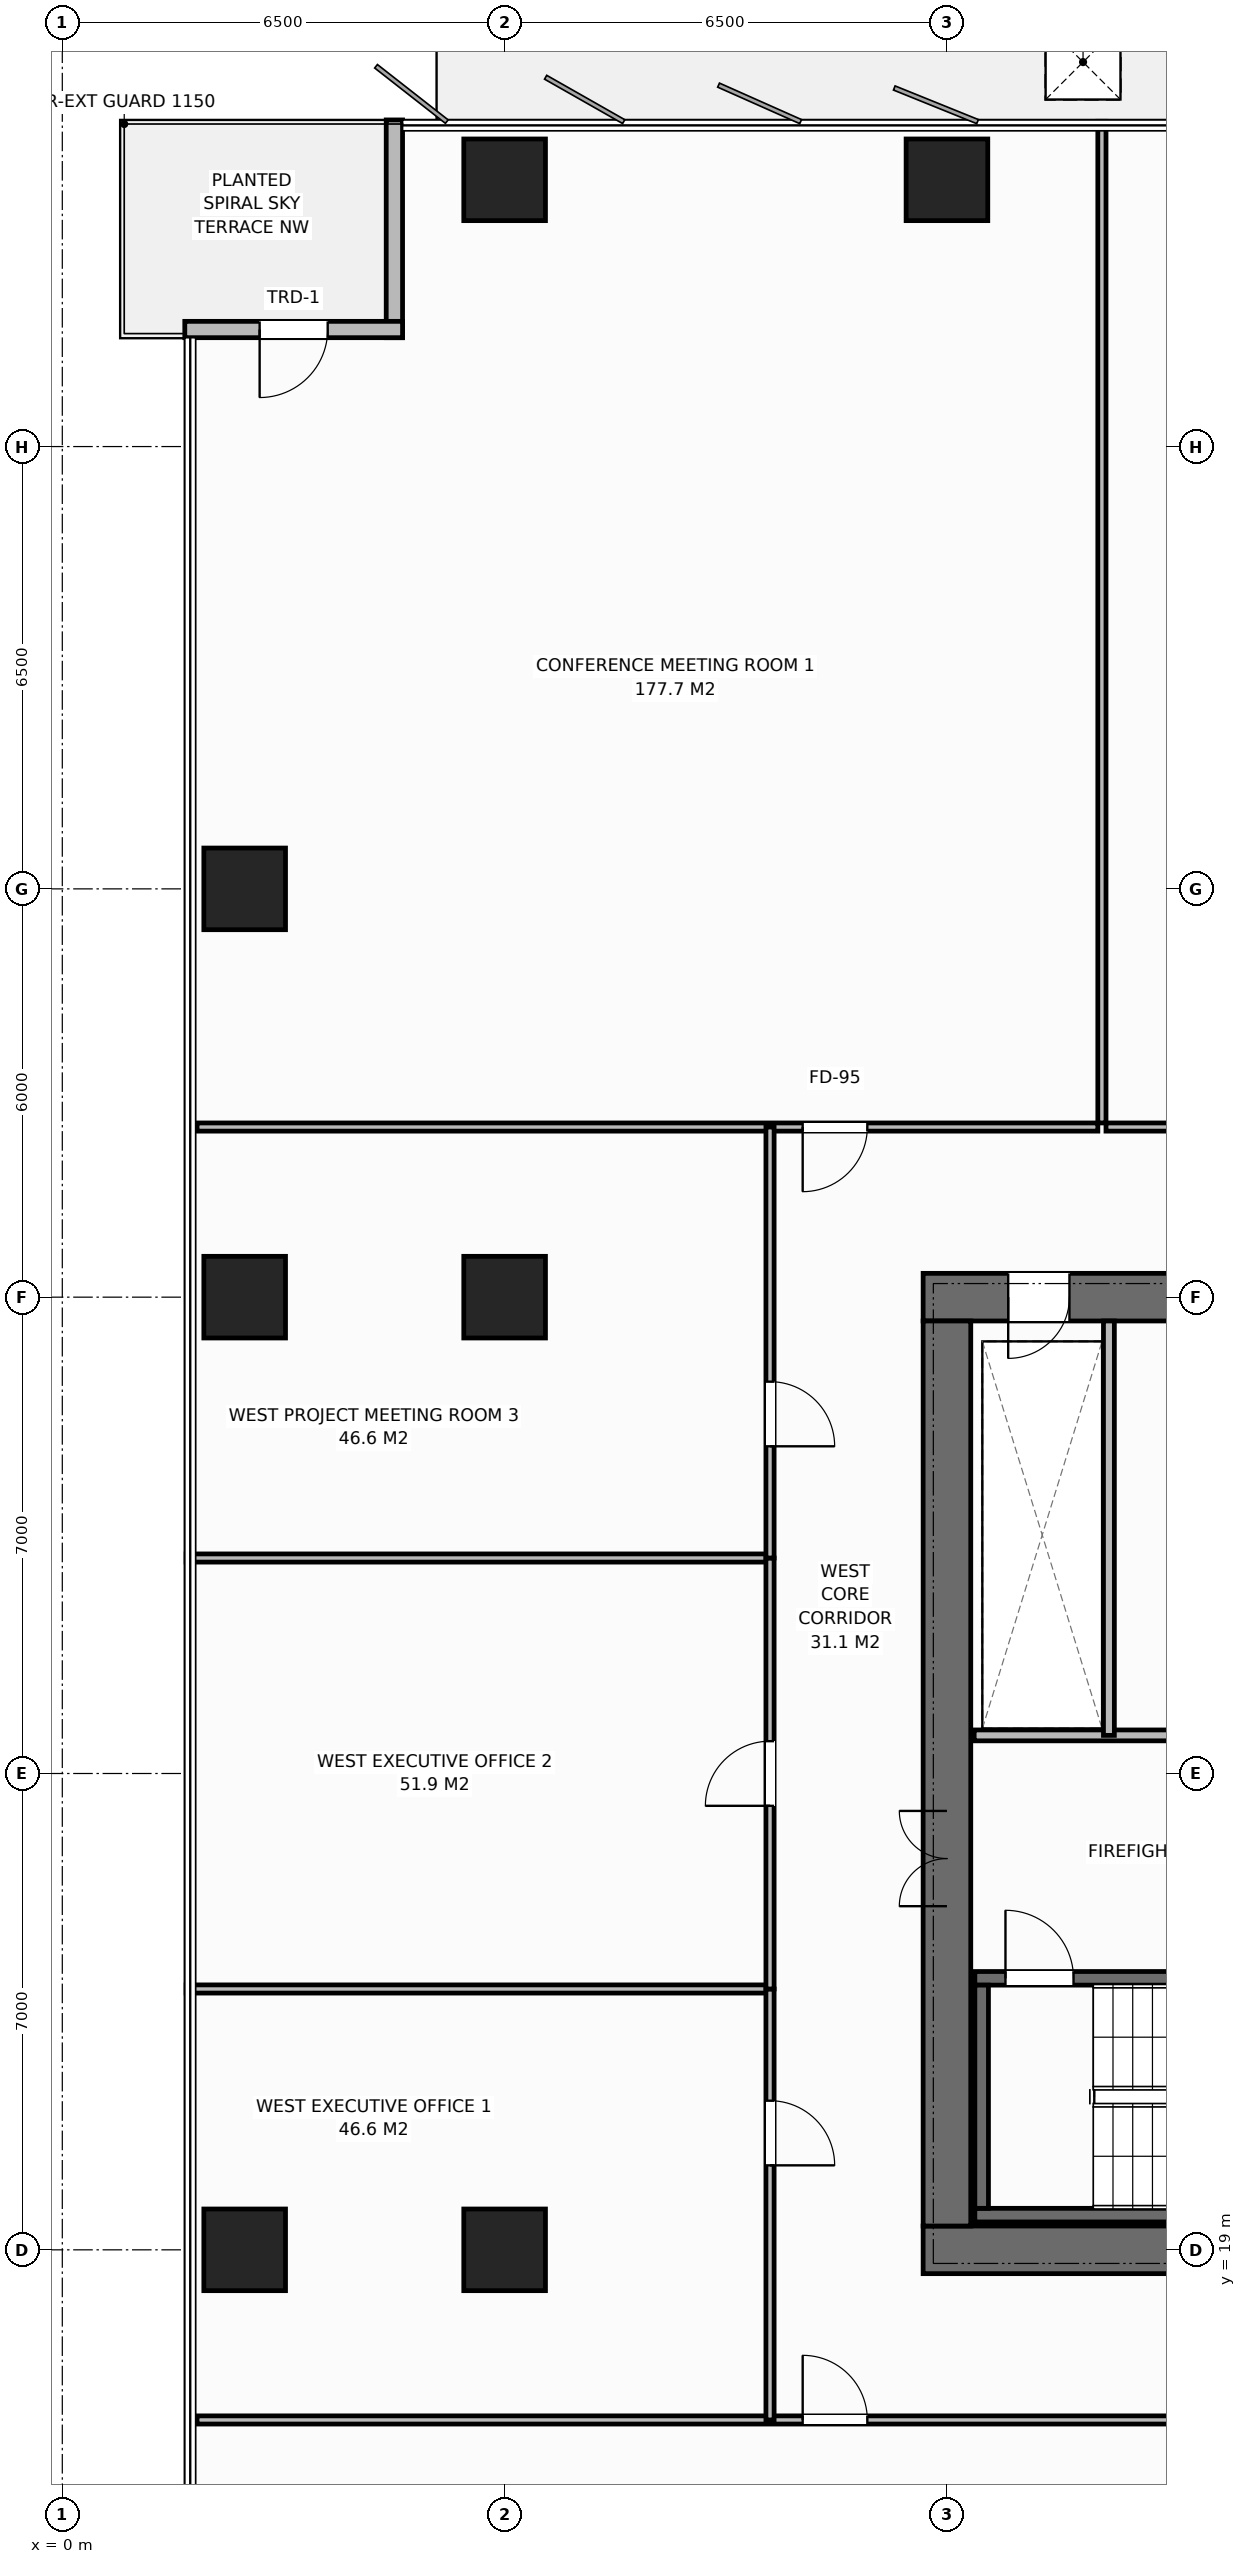
"""IFC4 building model, lengths in metres.
Left out: names, types, materials, properties, quantities, classifications, styles, units other than length and angle.
Written with IfcOpenShell. Run it as: python <this file> out.ifc"""

import sys

from ifc_helpers import new_model, si_unit, direction, frame, frame_2d, origin, origin_2d, place, context, subcontext, project, spatial, rectangle, extrude, element, fill, save


model = new_model("IFC4")
c1 = context("Model", 3, precision=1e-05, world=origin(), true_north=direction((0.0, 1.0)))
c2 = subcontext(c1, "Body", "Model", "MODEL_VIEW")
j1 = project(units=[si_unit("LENGTHUNIT", "METRE"), si_unit("PLANEANGLEUNIT", "RADIAN")], contexts=[c1])
p1 = place(None, origin())
s1 = spatial("IfcSite", under=j1, at=p1, CompositionType="ELEMENT")
p2 = place(p1, origin())
s2 = spatial("IfcBuilding", under=s1, at=p2, CompositionType="ELEMENT")
p3 = place(p2, frame((0.0, 0.0, 86.0)))
s3 = spatial("IfcBuildingStorey", under=s2, at=p3, CompositionType="ELEMENT", Elevation=86.0)
p4 = place(p3, frame((12.65, 19.0, 0.0), z_axis=(0.0, 0.0, 1.0), x_axis=(1.0, 0.0, 0.0)))
e1 = element("IfcWall", 1, at=p4, inside=s3, PredefinedType="SHEAR", context=c2, shape_type="SweptSolid", body=[
    extrude(rectangle(XDim=13.7, YDim=0.7, at=frame_2d((6.85, 0.0))), origin(), (0.0, 0.0, 1.0), 3.8),
])
p5 = place(p4, frame((9.23, 0.0, 0.0)))
e2 = element("IfcOpeningElement", 2, at=p5, cuts=e1, PredefinedType="OPENING", context=c2, shape_type="SweptSolid", body=[
    extrude(rectangle(XDim=1.4, YDim=2.2, at=frame_2d((0.7, 1.1))), frame((0.0, 0.36, 0.0), z_axis=(0.0, -1.0, 0.0), x_axis=(1.0, 0.0, 0.0)), (0.0, 0.0, 1.0), 0.72),
])
p6 = place(p3, frame((12.65, 33.0, 0.0), z_axis=(0.0, 0.0, 1.0), x_axis=(1.0, 0.0, 0.0)))
e3 = element("IfcWall", 3, at=p6, inside=s3, PredefinedType="SHEAR", context=c2, shape_type="SweptSolid", body=[
    extrude(rectangle(XDim=13.7, YDim=0.7, at=frame_2d((6.85, 0.0))), origin(), (0.0, 0.0, 1.0), 3.8),
])
p7 = place(p6, frame((1.25, 0.0, 0.0)))
e4 = element("IfcOpeningElement", 4, at=p7, cuts=e3, PredefinedType="OPENING", context=c2, shape_type="SweptSolid", body=[
    extrude(rectangle(XDim=0.9, YDim=2.15, at=frame_2d((0.45, 1.075))), frame((0.0, 0.36, 0.0), z_axis=(0.0, -1.0, 0.0), x_axis=(1.0, 0.0, 0.0)), (0.0, 0.0, 1.0), 0.72),
])
p8 = place(p6, frame((3.85, 0.0, 0.0)))
e5 = element("IfcOpeningElement", 5, at=p8, cuts=e3, PredefinedType="OPENING", context=c2, shape_type="SweptSolid", body=[
    extrude(rectangle(XDim=0.95, YDim=2.15, at=frame_2d((0.475, 1.075))), frame((0.0, 0.36, 0.0), z_axis=(0.0, -1.0, 0.0), x_axis=(1.0, 0.0, 0.0)), (0.0, 0.0, 1.0), 0.72),
])
p9 = place(p6, frame((6.85, 0.0, 0.0)))
e6 = element("IfcOpeningElement", 6, at=p9, cuts=e3, PredefinedType="OPENING", context=c2, shape_type="SweptSolid", body=[
    extrude(rectangle(XDim=0.95, YDim=2.15, at=frame_2d((0.475, 1.075))), frame((0.0, 0.36, 0.0), z_axis=(0.0, -1.0, 0.0), x_axis=(1.0, 0.0, 0.0)), (0.0, 0.0, 1.0), 0.72),
])
p10 = place(p6, frame((9.23, 0.0, 0.0)))
e7 = element("IfcOpeningElement", 7, at=p10, cuts=e3, PredefinedType="OPENING", context=c2, shape_type="SweptSolid", body=[
    extrude(rectangle(XDim=1.4, YDim=2.2, at=frame_2d((0.7, 1.1))), frame((0.0, 0.36, 0.0), z_axis=(0.0, -1.0, 0.0), x_axis=(1.0, 0.0, 0.0)), (0.0, 0.0, 1.0), 0.72),
])
p11 = place(p3, frame((13.0, 19.35, 0.0), z_axis=(0.0, 0.0, 1.0), x_axis=(0.0, 1.0, 0.0)))
e8 = element("IfcWall", 8, at=p11, inside=s3, PredefinedType="SHEAR", context=c2, shape_type="SweptSolid", body=[
    extrude(rectangle(XDim=13.3, YDim=0.7, at=frame_2d((6.65, 0.0))), origin(), (0.0, 0.0, 1.0), 3.8),
])
p12 = place(p11, frame((4.7, 0.0, 0.0)))
e9 = element("IfcOpeningElement", 9, at=p12, cuts=e8, PredefinedType="OPENING", context=c2, shape_type="SweptSolid", body=[
    extrude(rectangle(XDim=1.4, YDim=2.2, at=frame_2d((0.7, 1.1))), frame((0.0, 0.36, 0.0), z_axis=(0.0, -1.0, 0.0), x_axis=(1.0, 0.0, 0.0)), (0.0, 0.0, 1.0), 0.72),
])
p13 = place(p3, frame((13.41, 19.51, 0.0), z_axis=(0.0, 0.0, 1.0), x_axis=(1.0, 0.0, 0.0)))
e10 = element("IfcWall", 10, at=p13, inside=s3, PredefinedType="SHEAR", context=c2, shape_type="SweptSolid", body=[
    extrude(rectangle(XDim=8.43, YDim=0.2, at=frame_2d((4.215, 0.0))), origin(), (0.0, 0.0, 1.0), 3.8),
])
p14 = place(p3, frame((13.41, 22.99, 0.0), z_axis=(0.0, 0.0, 1.0), x_axis=(1.0, 0.0, 0.0)))
e11 = element("IfcWall", 11, at=p14, inside=s3, PredefinedType="SHEAR", context=c2, shape_type="SweptSolid", body=[
    extrude(rectangle(XDim=8.43, YDim=0.2, at=frame_2d((4.215, 0.0))), origin(), (0.0, 0.0, 1.0), 3.8),
])
p15 = place(p14, frame((0.45, 0.0, 0.0)))
e12 = element("IfcOpeningElement", 12, at=p15, cuts=e11, PredefinedType="OPENING", context=c2, shape_type="SweptSolid", body=[
    extrude(rectangle(XDim=1.0, YDim=2.15, at=frame_2d((0.5, 1.075))), frame((0.0, 0.11, 0.0), z_axis=(0.0, -1.0, 0.0), x_axis=(1.0, 0.0, 0.0)), (0.0, 0.0, 1.0), 0.22),
])
p16 = place(p3, frame((13.51, 19.61, 0.0), z_axis=(0.0, 0.0, 1.0), x_axis=(0.0, 1.0, 0.0)))
e13 = element("IfcWall", 13, at=p16, inside=s3, PredefinedType="SHEAR", context=c2, shape_type="SweptSolid", body=[
    extrude(rectangle(XDim=3.28, YDim=0.2, at=frame_2d((1.64, 0.0))), origin(), (0.0, 0.0, 1.0), 3.8),
])
for number, where, z_axis, x_axis in (
    (14, (6.5, 19.0, 0.0), (0.0, 0.0, 1.0), (1.0, 0.0, 0.0)),
    (15, (6.5, 33.0, 0.0), (0.0, 0.0, 1.0), (1.0, 0.0, 0.0)),
    (16, (6.5, 49.42, 0.0), (0.0, 0.0, 1.0), (1.0, 0.0, 0.0)),
    (17, (13.0, 49.42, 0.0), (0.0, 0.0, 1.0), (1.0, 0.0, 0.0)),
    (18, (2.68, 19.0, 0.0), (0.0, 0.0, 1.0), (1.0, 0.0, 0.0)),
    (19, (2.68, 33.0, 0.0), (0.0, 0.0, 1.0), (1.0, 0.0, 0.0)),
    (20, (2.68, 39.0, 0.0), (0.0, 0.0, 1.0), (1.0, 0.0, 0.0)),
):
    element("IfcColumn", number, at=place(p3, frame(where, z_axis=z_axis, x_axis=x_axis)), inside=s3, PredefinedType="COLUMN", context=c2, shape_type="SweptSolid", body=[
        extrude(rectangle(XDim=1.2, YDim=1.2, at=origin_2d()), origin(), (0.0, 0.0, 1.0), 3.8),
    ])
p17 = place(p3, frame((4.88, 47.1, 0.0), z_axis=(0.0, 0.0, 1.0), x_axis=(0.0, 1.0, 0.0)))
e21 = element("IfcWall", 21, at=p17, inside=s3, PredefinedType="STANDARD", context=c2, shape_type="SweptSolid", body=[
    extrude(rectangle(XDim=3.2, YDim=0.24, at=frame_2d((1.6, 0.0))), origin(), (0.0, 0.0, 1.0), 3.565),
])
p18 = place(p3, frame((1.8, 47.22, 0.0), z_axis=(0.0, 0.0, 1.0), x_axis=(1.0, 0.0, 0.0)))
e22 = element("IfcWall", 22, at=p18, inside=s3, PredefinedType="STANDARD", context=c2, shape_type="SweptSolid", body=[
    extrude(rectangle(XDim=3.2, YDim=0.24, at=frame_2d((1.6, 0.0))), origin(), (0.0, 0.0, 1.0), 3.565),
])
p19 = place(p18, frame((1.1, 0.0, 0.0)))
e23 = element("IfcOpeningElement", 23, at=p19, cuts=e22, PredefinedType="OPENING", context=c2, shape_type="SweptSolid", body=[
    extrude(rectangle(XDim=1.0, YDim=2.2, at=frame_2d((0.5, 1.1))), frame((0.0, 0.13, 0.0), z_axis=(0.0, -1.0, 0.0), x_axis=(1.0, 0.0, 0.0)), (0.0, 0.0, 1.0), 0.26),
])
p20 = place(p3, frame((13.4, 26.56, 0.0), z_axis=(0.0, 0.0, 1.0), x_axis=(1.0, 0.0, 0.0)))
e24 = element("IfcWall", 24, at=p20, inside=s3, PredefinedType="STANDARD", context=c2, shape_type="SweptSolid", body=[
    extrude(rectangle(XDim=8.34, YDim=0.16, at=frame_2d((4.17, 0.0))), origin(), (0.0, 0.0, 1.0), 3.565),
])
p21 = place(p3, frame((15.38, 26.56, 0.0), z_axis=(0.0, 0.0, 1.0), x_axis=(0.0, 1.0, 0.0)))
e25 = element("IfcWall", 25, at=p21, inside=s3, PredefinedType="STANDARD", context=c2, shape_type="SweptSolid", body=[
    extrude(rectangle(XDim=6.09, YDim=0.16, at=frame_2d((3.045, 0.0))), origin(), (0.0, 0.0, 1.0), 3.565),
])
p22 = place(p3, frame((15.277, 35.56, 0.0), z_axis=(0.0, 0.0, 1.0), x_axis=(0.0, 1.0, 0.0)))
e26 = element("IfcWall", 26, at=p22, inside=s3, PredefinedType="PARTITIONING", context=c2, shape_type="SweptSolid", body=[
    extrude(rectangle(XDim=14.72, YDim=0.12, at=frame_2d((7.36, 0.0))), origin(), (0.0, 0.0, 1.0), 3.565),
])
p23 = place(p3, frame((1.98, 35.5, 0.0), z_axis=(0.0, 0.0, 1.0), x_axis=(1.0, 0.0, 0.0)))
e27 = element("IfcWall", 27, at=p23, inside=s3, PredefinedType="PARTITIONING", context=c2, shape_type="SweptSolid", body=[
    extrude(rectangle(XDim=13.237, YDim=0.12, at=frame_2d((6.619, 0.0))), origin(), (0.0, 0.0, 1.0), 3.565),
])
p24 = place(p23, frame((8.9, 0.0, 0.0)))
e28 = element("IfcOpeningElement", 28, at=p24, cuts=e27, PredefinedType="OPENING", context=c2, shape_type="SweptSolid", body=[
    extrude(rectangle(XDim=0.95, YDim=2.15, at=frame_2d((0.475, 1.075))), frame((0.0, 0.07, 0.0), z_axis=(0.0, -1.0, 0.0), x_axis=(1.0, 0.0, 0.0)), (0.0, 0.0, 1.0), 0.14),
])
p25 = place(p3, frame((15.337, 35.5, 0.0), z_axis=(0.0, 0.0, 1.0), x_axis=(1.0, 0.0, 0.0)))
e29 = element("IfcWall", 29, at=p25, inside=s3, PredefinedType="PARTITIONING", context=c2, shape_type="SweptSolid", body=[
    extrude(rectangle(XDim=15.64, YDim=0.12, at=frame_2d((7.82, 0.0))), origin(), (0.0, 0.0, 1.0), 3.565),
])
p26 = place(p25, frame((7.345, 0.0, 0.0)))
e30 = element("IfcOpeningElement", 30, at=p26, cuts=e29, PredefinedType="OPENING", context=c2, shape_type="SweptSolid", body=[
    extrude(rectangle(XDim=0.95, YDim=2.15, at=frame_2d((0.475, 1.075))), frame((0.0, 0.07, 0.0), z_axis=(0.0, -1.0, 0.0), x_axis=(1.0, 0.0, 0.0)), (0.0, 0.0, 1.0), 0.14),
])
p27 = place(p3, frame((1.98, 16.5, 0.0), z_axis=(0.0, 0.0, 1.0), x_axis=(1.0, 0.0, 0.0)))
e31 = element("IfcWall", 31, at=p27, inside=s3, PredefinedType="PARTITIONING", context=c2, shape_type="SweptSolid", body=[
    extrude(rectangle(XDim=24.203, YDim=0.12, at=frame_2d((12.102, 0.0))), origin(), (0.0, 0.0, 1.0), 3.565),
])
p28 = place(p27, frame((8.9, 0.0, 0.0)))
e32 = element("IfcOpeningElement", 32, at=p28, cuts=e31, PredefinedType="OPENING", context=c2, shape_type="SweptSolid", body=[
    extrude(rectangle(XDim=0.95, YDim=2.15, at=frame_2d((0.475, 1.075))), frame((0.0, 0.07, 0.0), z_axis=(0.0, -1.0, 0.0), x_axis=(1.0, 0.0, 0.0)), (0.0, 0.0, 1.0), 0.14),
])
p29 = place(p3, frame((1.82, 22.833, 0.0), z_axis=(0.0, 0.0, 1.0), x_axis=(1.0, 0.0, 0.0)))
e33 = element("IfcWall", 33, at=p29, inside=s3, PredefinedType="PARTITIONING", context=c2, shape_type="SweptSolid", body=[
    extrude(rectangle(XDim=8.58, YDim=0.12, at=frame_2d((4.29, 0.0))), origin(), (0.0, 0.0, 1.0), 3.565),
])
p30 = place(p3, frame((10.4, 16.5, 0.0), z_axis=(0.0, 0.0, 1.0), x_axis=(0.0, 1.0, 0.0)))
e34 = element("IfcWall", 34, at=p30, inside=s3, PredefinedType="PARTITIONING", context=c2, shape_type="SweptSolid", body=[
    extrude(rectangle(XDim=6.333, YDim=0.12, at=frame_2d((3.167, 0.0))), origin(), (0.0, 0.0, 1.0), 3.565),
])
p31 = place(p30, frame((3.742, 0.0, 0.0)))
e35 = element("IfcOpeningElement", 35, at=p31, cuts=e34, PredefinedType="OPENING", context=c2, shape_type="SweptSolid", body=[
    extrude(rectangle(XDim=0.95, YDim=2.15, at=frame_2d((0.475, 1.075))), frame((0.0, 0.07, 0.0), z_axis=(0.0, -1.0, 0.0), x_axis=(1.0, 0.0, 0.0)), (0.0, 0.0, 1.0), 0.14),
])
p32 = place(p3, frame((1.82, 29.167, 0.0), z_axis=(0.0, 0.0, 1.0), x_axis=(1.0, 0.0, 0.0)))
e36 = element("IfcWall", 36, at=p32, inside=s3, PredefinedType="PARTITIONING", context=c2, shape_type="SweptSolid", body=[
    extrude(rectangle(XDim=8.58, YDim=0.12, at=frame_2d((4.29, 0.0))), origin(), (0.0, 0.0, 1.0), 3.565),
])
p33 = place(p3, frame((10.4, 22.833, 0.0), z_axis=(0.0, 0.0, 1.0), x_axis=(0.0, 1.0, 0.0)))
e37 = element("IfcWall", 37, at=p33, inside=s3, PredefinedType="PARTITIONING", context=c2, shape_type="SweptSolid", body=[
    extrude(rectangle(XDim=6.333, YDim=0.12, at=frame_2d((3.167, 0.0))), origin(), (0.0, 0.0, 1.0), 3.565),
])
p34 = place(p33, frame((2.692, 0.0, 0.0)))
e38 = element("IfcOpeningElement", 38, at=p34, cuts=e37, PredefinedType="OPENING", context=c2, shape_type="SweptSolid", body=[
    extrude(rectangle(XDim=0.95, YDim=2.15, at=frame_2d((0.475, 1.075))), frame((0.0, 0.07, 0.0), z_axis=(0.0, -1.0, 0.0), x_axis=(1.0, 0.0, 0.0)), (0.0, 0.0, 1.0), 0.14),
])
p35 = place(p3, frame((10.4, 29.167, 0.0), z_axis=(0.0, 0.0, 1.0), x_axis=(0.0, 1.0, 0.0)))
e39 = element("IfcWall", 39, at=p35, inside=s3, PredefinedType="PARTITIONING", context=c2, shape_type="SweptSolid", body=[
    extrude(rectangle(XDim=6.333, YDim=0.12, at=frame_2d((3.167, 0.0))), origin(), (0.0, 0.0, 1.0), 3.565),
])
p36 = place(p35, frame((1.642, 0.0, 0.0)))
e40 = element("IfcOpeningElement", 40, at=p36, cuts=e39, PredefinedType="OPENING", context=c2, shape_type="SweptSolid", body=[
    extrude(rectangle(XDim=0.95, YDim=2.15, at=frame_2d((0.475, 1.075))), frame((0.0, 0.07, 0.0), z_axis=(0.0, -1.0, 0.0), x_axis=(1.0, 0.0, 0.0)), (0.0, 0.0, 1.0), 0.14),
])
p37 = place(p19, origin())
e41 = element("IfcDoor", 41, at=p37, inside=s3, OperationType="SINGLE_SWING_RIGHT", PredefinedType="DOOR", context=c2, shape_type="SweptSolid", body=[
    extrude(rectangle(XDim=1.0, YDim=2.2, at=frame_2d((0.5, 1.1))), frame((0.0, 0.025, 0.0), z_axis=(0.0, -1.0, 0.0), x_axis=(1.0, 0.0, 0.0)), (0.0, 0.0, 1.0), 0.05),
])
fill(e23, e41)
p38 = place(p3, frame((0.0, 0.0, -0.21)))
p39 = place(p38, frame((15.0, 51.15, 0.0)))
p40 = place(p39, frame((0.0, 0.0, 0.21)))
e42 = element("IfcDoor", 42, at=p40, inside=s3, OperationType="SINGLE_SWING_LEFT", PredefinedType="TRAPDOOR", context=c2, shape_type="SweptSolid", body=[
    extrude(rectangle(XDim=1.1, YDim=1.1, at=origin_2d()), origin(), (0.0, 0.0, 1.0), 0.05),
])
p41 = place(p15, origin())
e43 = element("IfcDoor", 43, at=p41, inside=s3, OperationType="SINGLE_SWING_LEFT", PredefinedType="DOOR", context=c2, shape_type="SweptSolid", body=[
    extrude(rectangle(XDim=1.0, YDim=2.15, at=frame_2d((0.5, 1.075))), frame((0.0, 0.025, 0.0), z_axis=(0.0, -1.0, 0.0), x_axis=(1.0, 0.0, 0.0)), (0.0, 0.0, 1.0), 0.05),
])
fill(e12, e43)
p42 = place(p12, origin())
e44 = element("IfcDoor", 44, at=p42, inside=s3, OperationType="DOUBLE_DOOR_SINGLE_SWING", PredefinedType="DOOR", context=c2, shape_type="SweptSolid", body=[
    extrude(rectangle(XDim=1.4, YDim=2.2, at=frame_2d((0.7, 1.1))), frame((0.0, 0.025, 0.0), z_axis=(0.0, -1.0, 0.0), x_axis=(1.0, 0.0, 0.0)), (0.0, 0.0, 1.0), 0.05),
])
fill(e9, e44)
p43 = place(p7, origin())
e45 = element("IfcDoor", 45, at=p43, inside=s3, OperationType="SINGLE_SWING_RIGHT", PredefinedType="DOOR", context=c2, shape_type="SweptSolid", body=[
    extrude(rectangle(XDim=0.9, YDim=2.15, at=frame_2d((0.45, 1.075))), frame((0.0, -0.075, 0.0), z_axis=(0.0, -1.0, 0.0), x_axis=(1.0, 0.0, 0.0)), (0.0, 0.0, 1.0), 0.05),
])
fill(e4, e45)
p44 = place(p24, origin())
e46 = element("IfcDoor", 46, at=p44, inside=s3, OperationType="SINGLE_SWING_RIGHT", PredefinedType="DOOR", context=c2, shape_type="SweptSolid", body=[
    extrude(rectangle(XDim=0.95, YDim=2.15, at=frame_2d((0.475, 1.075))), frame((0.0, 0.025, 0.0), z_axis=(0.0, -1.0, 0.0), x_axis=(1.0, 0.0, 0.0)), (0.0, 0.0, 1.0), 0.05),
])
fill(e28, e46)
p45 = place(p28, origin())
e47 = element("IfcDoor", 47, at=p45, inside=s3, OperationType="SINGLE_SWING_LEFT", PredefinedType="DOOR", context=c2, shape_type="SweptSolid", body=[
    extrude(rectangle(XDim=0.95, YDim=2.15, at=frame_2d((0.475, 1.075))), frame((0.0, 0.025, 0.0), z_axis=(0.0, -1.0, 0.0), x_axis=(1.0, 0.0, 0.0)), (0.0, 0.0, 1.0), 0.05),
])
fill(e32, e47)
p46 = place(p31, origin())
e48 = element("IfcDoor", 48, at=p46, inside=s3, OperationType="SINGLE_SWING_RIGHT", PredefinedType="DOOR", context=c2, shape_type="SweptSolid", body=[
    extrude(rectangle(XDim=0.95, YDim=2.15, at=frame_2d((0.475, 1.075))), frame((0.0, 0.025, 0.0), z_axis=(0.0, -1.0, 0.0), x_axis=(1.0, 0.0, 0.0)), (0.0, 0.0, 1.0), 0.05),
])
fill(e35, e48)
p47 = place(p34, origin())
e49 = element("IfcDoor", 49, at=p47, inside=s3, OperationType="SINGLE_SWING_LEFT", PredefinedType="DOOR", context=c2, shape_type="SweptSolid", body=[
    extrude(rectangle(XDim=0.95, YDim=2.15, at=frame_2d((0.475, 1.075))), frame((0.0, 0.025, 0.0), z_axis=(0.0, -1.0, 0.0), x_axis=(1.0, 0.0, 0.0)), (0.0, 0.0, 1.0), 0.05),
])
fill(e38, e49)
p48 = place(p36, origin())
e50 = element("IfcDoor", 50, at=p48, inside=s3, OperationType="SINGLE_SWING_RIGHT", PredefinedType="DOOR", context=c2, shape_type="SweptSolid", body=[
    extrude(rectangle(XDim=0.95, YDim=2.15, at=frame_2d((0.475, 1.075))), frame((0.0, 0.025, 0.0), z_axis=(0.0, -1.0, 0.0), x_axis=(1.0, 0.0, 0.0)), (0.0, 0.0, 1.0), 0.05),
])
fill(e40, e50)
save(model, sys.argv[1])
